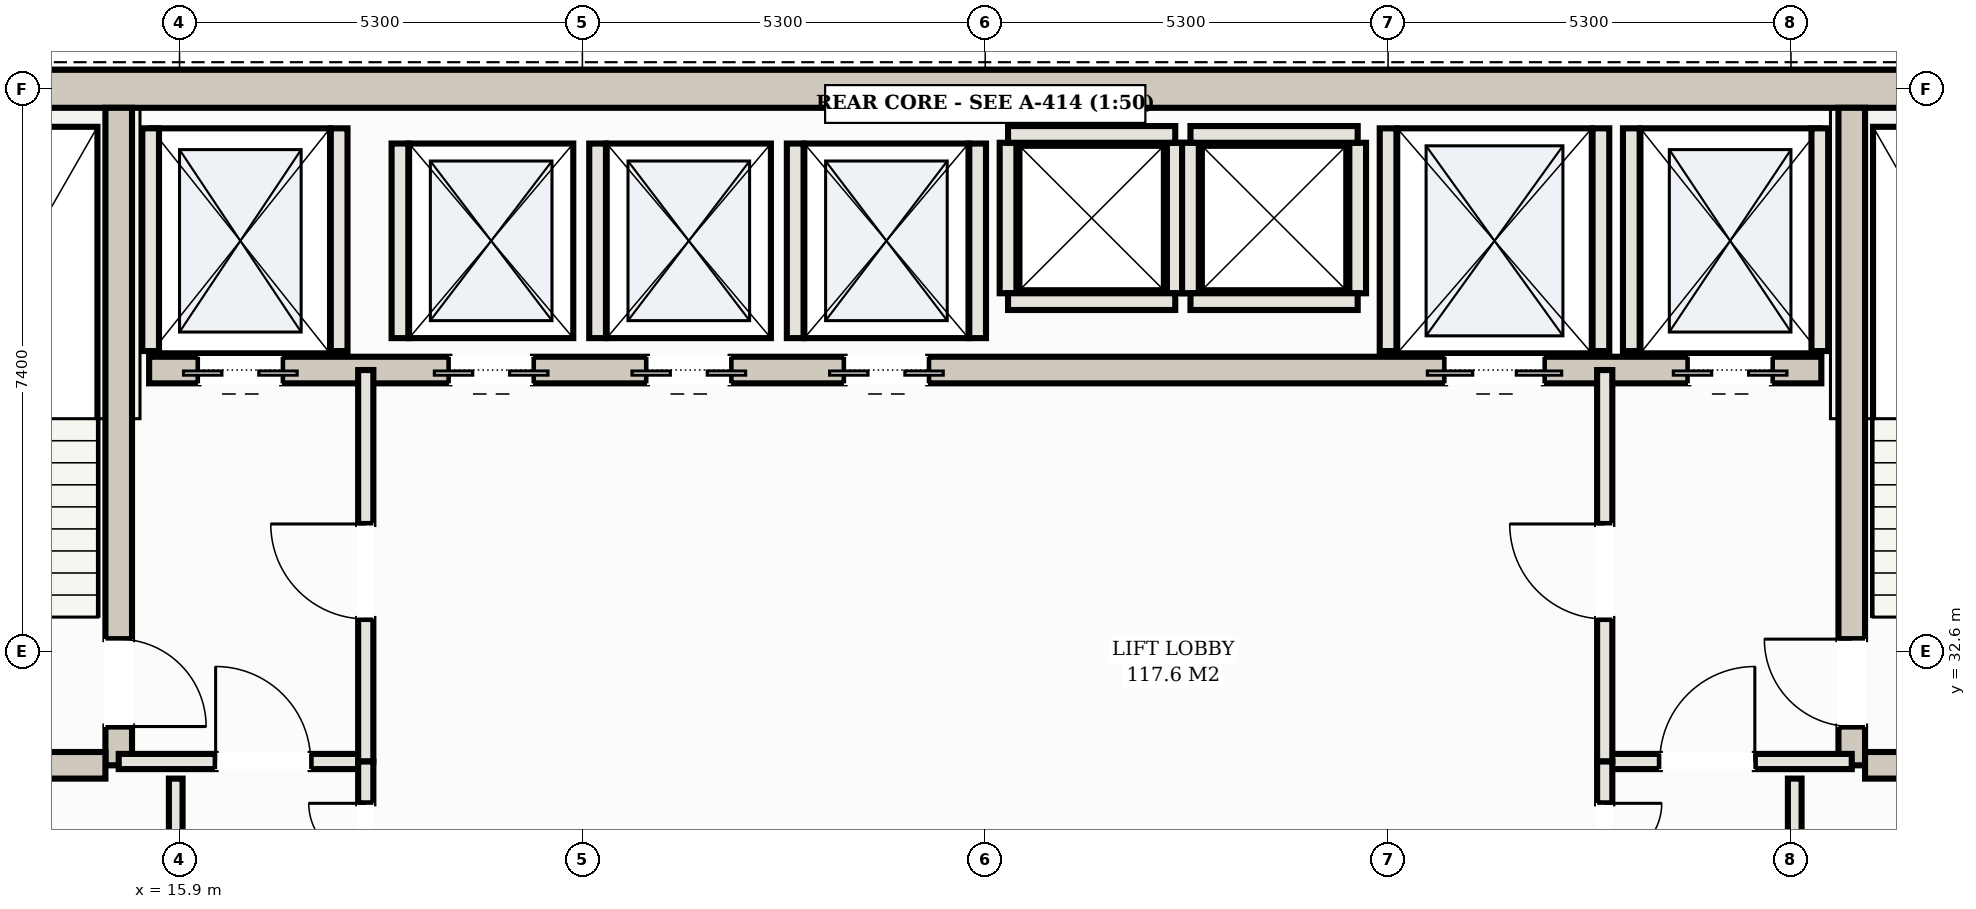
"""IFC4 building model, lengths in metres.
Left out: names, types, materials, properties, quantities, classifications, styles, units other than length and angle.
Written with IfcOpenShell. Run it as: python <this file> out.ifc"""

import sys

from ifc_helpers import new_model, si_unit, direction, frame, frame_2d, origin, place, context, subcontext, project, spatial, rectangle, extrude, element, fill, save


model = new_model("IFC4")
c1 = context("Model", 3, precision=1e-05, world=origin(), true_north=direction((0.0, 1.0)))
c2 = subcontext(c1, "Body", "Model", "MODEL_VIEW")
j1 = project(units=[si_unit("LENGTHUNIT", "METRE"), si_unit("PLANEANGLEUNIT", "RADIAN")], contexts=[c1])
p1 = place(None, origin())
s1 = spatial("IfcSite", under=j1, at=p1, CompositionType="ELEMENT")
p2 = place(p1, origin())
s2 = spatial("IfcBuilding", under=s1, at=p2, CompositionType="ELEMENT")
p3 = place(p2, frame((0.0, 0.0, 256.1)))
s3 = spatial("IfcBuildingStorey", under=s2, at=p3, CompositionType="ELEMENT", Elevation=256.1)
p4 = place(p3, frame((10.35, 40.0, 0.0), z_axis=(0.0, 0.0, 1.0), x_axis=(1.0, 0.0, 0.0)))
e1 = element("IfcWall", 1, at=p4, inside=s3, PredefinedType="SHEAR", context=c2, shape_type="SweptSolid", body=[
    extrude(rectangle(XDim=32.3, YDim=0.5, at=frame_2d((16.15, 0.0))), origin(), (0.0, 0.0, 1.0), 3.11),
])
p5 = place(p3, frame((15.1, 31.1, 0.0), z_axis=(0.0, 0.0, 1.0), x_axis=(0.0, 1.0, 0.0)))
e2 = element("IfcWall", 2, at=p5, inside=s3, PredefinedType="SHEAR", context=c2, shape_type="SweptSolid", body=[
    extrude(rectangle(XDim=8.65, YDim=0.35, at=frame_2d((4.325, 0.0))), origin(), (0.0, 0.0, 1.0), 3.11),
])
p6 = place(p5, frame((0.51, 0.0, 0.0)))
e3 = element("IfcOpeningElement", 3, at=p6, cuts=e2, PredefinedType="OPENING", context=c2, shape_type="SweptSolid", body=[
    extrude(rectangle(XDim=1.15, YDim=2.2, at=frame_2d((0.575, 1.1))), frame((0.0, 0.185, 0.0), z_axis=(0.0, -1.0, 0.0), x_axis=(1.0, 0.0, 0.0)), (0.0, 0.0, 1.0), 0.37),
])
p7 = place(p3, frame((10.85, 31.1, 0.0), z_axis=(0.0, 0.0, 1.0), x_axis=(1.0, 0.0, 0.0)))
e4 = element("IfcWall", 4, at=p7, inside=s3, PredefinedType="SHEAR", context=c2, shape_type="SweptSolid", body=[
    extrude(rectangle(XDim=4.075, YDim=0.35, at=frame_2d((2.038, 0.0))), origin(), (0.0, 0.0, 1.0), 3.11),
])
p8 = place(p3, frame((37.9, 31.1, 0.0), z_axis=(0.0, 0.0, 1.0), x_axis=(0.0, 1.0, 0.0)))
e5 = element("IfcWall", 5, at=p8, inside=s3, PredefinedType="SHEAR", context=c2, shape_type="SweptSolid", body=[
    extrude(rectangle(XDim=8.65, YDim=0.35, at=frame_2d((4.325, 0.0))), origin(), (0.0, 0.0, 1.0), 3.11),
])
p9 = place(p8, frame((0.51, 0.0, 0.0)))
e6 = element("IfcOpeningElement", 6, at=p9, cuts=e5, PredefinedType="OPENING", context=c2, shape_type="SweptSolid", body=[
    extrude(rectangle(XDim=1.15, YDim=2.2, at=frame_2d((0.575, 1.1))), frame((0.0, 0.185, 0.0), z_axis=(0.0, -1.0, 0.0), x_axis=(1.0, 0.0, 0.0)), (0.0, 0.0, 1.0), 0.37),
])
p10 = place(p3, frame((38.075, 31.1, 0.0), z_axis=(0.0, 0.0, 1.0), x_axis=(1.0, 0.0, 0.0)))
e7 = element("IfcWall", 7, at=p10, inside=s3, PredefinedType="SHEAR", context=c2, shape_type="SweptSolid", body=[
    extrude(rectangle(XDim=4.075, YDim=0.35, at=frame_2d((2.038, 0.0))), origin(), (0.0, 0.0, 1.0), 3.11),
])
p11 = place(p3, frame((15.5, 36.3, 0.0), z_axis=(0.0, 0.0, 1.0), x_axis=(1.0, 0.0, 0.0)))
e8 = element("IfcWall", 8, at=p11, inside=s3, PredefinedType="SHEAR", context=c2, shape_type="SweptSolid", body=[
    extrude(rectangle(XDim=22.0, YDim=0.35, at=frame_2d((11.0, 0.0))), origin(), (0.0, 0.0, 1.0), 3.11),
])
p12 = place(p11, frame((0.65, 0.0, 0.0)))
e9 = element("IfcOpeningElement", 9, at=p12, cuts=e8, PredefinedType="OPENING", context=c2, shape_type="SweptSolid", body=[
    extrude(rectangle(XDim=1.1, YDim=2.15, at=frame_2d((0.55, 1.075))), frame((0.0, 0.185, 0.0), z_axis=(0.0, -1.0, 0.0), x_axis=(1.0, 0.0, 0.0)), (0.0, 0.0, 1.0), 0.37),
])
p13 = place(p11, frame((20.25, 0.0, 0.0)))
e10 = element("IfcOpeningElement", 10, at=p13, cuts=e8, PredefinedType="OPENING", context=c2, shape_type="SweptSolid", body=[
    extrude(rectangle(XDim=1.1, YDim=2.15, at=frame_2d((0.55, 1.075))), frame((0.0, 0.185, 0.0), z_axis=(0.0, -1.0, 0.0), x_axis=(1.0, 0.0, 0.0)), (0.0, 0.0, 1.0), 0.37),
])
p14 = place(p11, frame((17.05, 0.0, 0.0)))
e11 = element("IfcOpeningElement", 11, at=p14, cuts=e8, PredefinedType="OPENING", context=c2, shape_type="SweptSolid", body=[
    extrude(rectangle(XDim=1.3, YDim=2.2, at=frame_2d((0.65, 1.1))), frame((0.0, 0.185, 0.0), z_axis=(0.0, -1.0, 0.0), x_axis=(1.0, 0.0, 0.0)), (0.0, 0.0, 1.0), 0.37),
])
p15 = place(p11, frame((3.95, 0.0, 0.0)))
e12 = element("IfcOpeningElement", 12, at=p15, cuts=e8, PredefinedType="OPENING", context=c2, shape_type="SweptSolid", body=[
    extrude(rectangle(XDim=1.1, YDim=2.15, at=frame_2d((0.55, 1.075))), frame((0.0, 0.185, 0.0), z_axis=(0.0, -1.0, 0.0), x_axis=(1.0, 0.0, 0.0)), (0.0, 0.0, 1.0), 0.37),
])
p16 = place(p11, frame((6.55, 0.0, 0.0)))
e13 = element("IfcOpeningElement", 13, at=p16, cuts=e8, PredefinedType="OPENING", context=c2, shape_type="SweptSolid", body=[
    extrude(rectangle(XDim=1.1, YDim=2.15, at=frame_2d((0.55, 1.075))), frame((0.0, 0.185, 0.0), z_axis=(0.0, -1.0, 0.0), x_axis=(1.0, 0.0, 0.0)), (0.0, 0.0, 1.0), 0.37),
])
p17 = place(p11, frame((9.15, 0.0, 0.0)))
e14 = element("IfcOpeningElement", 14, at=p17, cuts=e8, PredefinedType="OPENING", context=c2, shape_type="SweptSolid", body=[
    extrude(rectangle(XDim=1.1, YDim=2.15, at=frame_2d((0.55, 1.075))), frame((0.0, 0.185, 0.0), z_axis=(0.0, -1.0, 0.0), x_axis=(1.0, 0.0, 0.0)), (0.0, 0.0, 1.0), 0.37),
])
for number, where, z_axis, x_axis in (
    (15, (15.52, 36.55, 0.0), (0.0, 0.0, 1.0), (0.0, 1.0, 0.0)),
    (16, (18.0, 36.55, 0.0), (0.0, 0.0, 1.0), (0.0, 1.0, 0.0)),
    (17, (35.0, 36.55, 0.0), (0.0, 0.0, 1.0), (0.0, 1.0, 0.0)),
    (18, (37.48, 36.55, 0.0), (0.0, 0.0, 1.0), (0.0, 1.0, 0.0)),
    (19, (31.8, 36.55, 0.0), (0.0, 0.0, 1.0), (0.0, 1.0, 0.0)),
    (20, (34.6, 36.55, 0.0), (0.0, 0.0, 1.0), (0.0, 1.0, 0.0)),
):
    element("IfcWall", number, at=place(p3, frame(where, z_axis=z_axis, x_axis=x_axis)), inside=s3, PredefinedType="SOLIDWALL", context=c2, shape_type="SweptSolid", body=[
        extrude(rectangle(XDim=2.93, YDim=0.22, at=frame_2d((1.465, 0.0))), origin(), (0.0, 0.0, 1.0), 3.11),
    ])
for number, where, z_axis, x_axis in (
    (21, (18.8, 36.72, 0.0), (0.0, 0.0, 1.0), (0.0, 1.0, 0.0)),
    (22, (21.4, 36.72, 0.0), (0.0, 0.0, 1.0), (0.0, 1.0, 0.0)),
    (23, (24.0, 36.72, 0.0), (0.0, 0.0, 1.0), (0.0, 1.0, 0.0)),
    (24, (26.4, 36.72, 0.0), (0.0, 0.0, 1.0), (0.0, 1.0, 0.0)),
):
    element("IfcWall", number, at=place(p3, frame(where, z_axis=z_axis, x_axis=x_axis)), inside=s3, PredefinedType="SOLIDWALL", context=c2, shape_type="SweptSolid", body=[
        extrude(rectangle(XDim=2.56, YDim=0.22, at=frame_2d((1.28, 0.0))), origin(), (0.0, 0.0, 1.0), 3.11),
    ])
for number, where, z_axis, x_axis in (
    (25, (26.8, 37.31, 0.0), (0.0, 0.0, 1.0), (0.0, 1.0, 0.0)),
    (26, (29.0, 37.31, 0.0), (0.0, 0.0, 1.0), (0.0, 1.0, 0.0)),
):
    element("IfcWall", number, at=place(p3, frame(where, z_axis=z_axis, x_axis=x_axis)), inside=s3, PredefinedType="SOLIDWALL", context=c2, shape_type="SweptSolid", body=[
        extrude(rectangle(XDim=1.98, YDim=0.22, at=frame_2d((0.99, 0.0))), origin(), (0.0, 0.0, 1.0), 3.11),
    ])
for number, where, z_axis, x_axis in (
    (27, (26.8, 39.4, 0.0), (0.0, 0.0, 1.0), (1.0, 0.0, 0.0)),
    (28, (26.8, 37.2, 0.0), (0.0, 0.0, 1.0), (1.0, 0.0, 0.0)),
):
    element("IfcWall", number, at=place(p3, frame(where, z_axis=z_axis, x_axis=x_axis)), inside=s3, PredefinedType="SOLIDWALL", context=c2, shape_type="SweptSolid", body=[
        extrude(rectangle(XDim=2.2, YDim=0.22, at=frame_2d((1.1, 0.0))), origin(), (0.0, 0.0, 1.0), 3.11),
    ])
for number, where, z_axis, x_axis in (
    (29, (29.2, 37.31, 0.0), (0.0, 0.0, 1.0), (0.0, 1.0, 0.0)),
    (30, (31.4, 37.31, 0.0), (0.0, 0.0, 1.0), (0.0, 1.0, 0.0)),
):
    element("IfcWall", number, at=place(p3, frame(where, z_axis=z_axis, x_axis=x_axis)), inside=s3, PredefinedType="SOLIDWALL", context=c2, shape_type="SweptSolid", body=[
        extrude(rectangle(XDim=1.98, YDim=0.22, at=frame_2d((0.99, 0.0))), origin(), (0.0, 0.0, 1.0), 3.11),
    ])
for number, where, z_axis, x_axis in (
    (31, (29.2, 39.4, 0.0), (0.0, 0.0, 1.0), (1.0, 0.0, 0.0)),
    (32, (29.2, 37.2, 0.0), (0.0, 0.0, 1.0), (1.0, 0.0, 0.0)),
):
    element("IfcWall", number, at=place(p3, frame(where, z_axis=z_axis, x_axis=x_axis)), inside=s3, PredefinedType="SOLIDWALL", context=c2, shape_type="SweptSolid", body=[
        extrude(rectangle(XDim=2.2, YDim=0.22, at=frame_2d((1.1, 0.0))), origin(), (0.0, 0.0, 1.0), 3.11),
    ])
p18 = place(p3, frame((15.1, 31.15, 0.0), z_axis=(0.0, 0.0, 1.0), x_axis=(1.0, 0.0, 0.0)))
e33 = element("IfcWall", 33, at=p18, inside=s3, PredefinedType="PARTITIONING", context=c2, shape_type="SweptSolid", body=[
    extrude(rectangle(XDim=3.25, YDim=0.2, at=frame_2d((1.625, 0.0))), origin(), (0.0, 0.0, 1.0), 2.45),
])
p19 = place(p18, frame((1.275, 0.0, 0.0)))
e34 = element("IfcOpeningElement", 34, at=p19, cuts=e33, PredefinedType="OPENING", context=c2, shape_type="SweptSolid", body=[
    extrude(rectangle(XDim=1.25, YDim=2.2, at=frame_2d((0.625, 1.1))), frame((0.0, 0.11, 0.0), z_axis=(0.0, -1.0, 0.0), x_axis=(1.0, 0.0, 0.0)), (0.0, 0.0, 1.0), 0.22),
])
p20 = place(p3, frame((18.35, 31.15, 0.0), z_axis=(0.0, 0.0, 1.0), x_axis=(0.0, 1.0, 0.0)))
e35 = element("IfcWall", 35, at=p20, inside=s3, PredefinedType="PARTITIONING", context=c2, shape_type="SweptSolid", body=[
    extrude(rectangle(XDim=5.15, YDim=0.2, at=frame_2d((2.575, 0.0))), origin(), (0.0, 0.0, 1.0), 2.45),
])
p21 = place(p20, frame((1.875, 0.0, 0.0)))
e36 = element("IfcOpeningElement", 36, at=p21, cuts=e35, PredefinedType="OPENING", context=c2, shape_type="SweptSolid", body=[
    extrude(rectangle(XDim=1.25, YDim=2.2, at=frame_2d((0.625, 1.1))), frame((0.0, 0.11, 0.0), z_axis=(0.0, -1.0, 0.0), x_axis=(1.0, 0.0, 0.0)), (0.0, 0.0, 1.0), 0.22),
])
p22 = place(p3, frame((34.65, 31.15, 0.0), z_axis=(0.0, 0.0, 1.0), x_axis=(1.0, 0.0, 0.0)))
e37 = element("IfcWall", 37, at=p22, inside=s3, PredefinedType="PARTITIONING", context=c2, shape_type="SweptSolid", body=[
    extrude(rectangle(XDim=3.25, YDim=0.2, at=frame_2d((1.625, 0.0))), origin(), (0.0, 0.0, 1.0), 2.45),
])
p23 = place(p22, frame((0.725, 0.0, 0.0)))
e38 = element("IfcOpeningElement", 38, at=p23, cuts=e37, PredefinedType="OPENING", context=c2, shape_type="SweptSolid", body=[
    extrude(rectangle(XDim=1.25, YDim=2.2, at=frame_2d((0.625, 1.1))), frame((0.0, 0.11, 0.0), z_axis=(0.0, -1.0, 0.0), x_axis=(1.0, 0.0, 0.0)), (0.0, 0.0, 1.0), 0.22),
])
p24 = place(p3, frame((34.65, 31.15, 0.0), z_axis=(0.0, 0.0, 1.0), x_axis=(0.0, 1.0, 0.0)))
e39 = element("IfcWall", 39, at=p24, inside=s3, PredefinedType="PARTITIONING", context=c2, shape_type="SweptSolid", body=[
    extrude(rectangle(XDim=5.15, YDim=0.2, at=frame_2d((2.575, 0.0))), origin(), (0.0, 0.0, 1.0), 2.45),
])
p25 = place(p24, frame((1.875, 0.0, 0.0)))
e40 = element("IfcOpeningElement", 40, at=p25, cuts=e39, PredefinedType="OPENING", context=c2, shape_type="SweptSolid", body=[
    extrude(rectangle(XDim=1.25, YDim=2.2, at=frame_2d((0.625, 1.1))), frame((0.0, 0.11, 0.0), z_axis=(0.0, -1.0, 0.0), x_axis=(1.0, 0.0, 0.0)), (0.0, 0.0, 1.0), 0.22),
])
p26 = place(p3, frame((15.85, 25.45, 0.0), z_axis=(0.0, 0.0, 1.0), x_axis=(0.0, 1.0, 0.0)))
e41 = element("IfcWall", 41, at=p26, inside=s3, PredefinedType="PARTITIONING", context=c2, shape_type="SweptSolid", body=[
    extrude(rectangle(XDim=5.475, YDim=0.18, at=frame_2d((2.738, 0.0))), origin(), (0.0, 0.0, 1.0), 2.45),
])
p27 = place(p26, frame((2.277, 0.0, 0.0)))
e42 = element("IfcOpeningElement", 42, at=p27, cuts=e41, PredefinedType="OPENING", context=c2, shape_type="SweptSolid", body=[
    extrude(rectangle(XDim=0.92, YDim=2.15, at=frame_2d((0.46, 1.075))), frame((0.0, 0.1, 0.0), z_axis=(0.0, -1.0, 0.0), x_axis=(1.0, 0.0, 0.0)), (0.0, 0.0, 1.0), 0.2),
])
p28 = place(p3, frame((37.15, 25.45, 0.0), z_axis=(0.0, 0.0, 1.0), x_axis=(0.0, 1.0, 0.0)))
e43 = element("IfcWall", 43, at=p28, inside=s3, PredefinedType="PARTITIONING", context=c2, shape_type="SweptSolid", body=[
    extrude(rectangle(XDim=5.475, YDim=0.18, at=frame_2d((2.738, 0.0))), origin(), (0.0, 0.0, 1.0), 2.45),
])
p29 = place(p28, frame((0.765, 0.0, 0.0)))
e44 = element("IfcOpeningElement", 44, at=p29, cuts=e43, PredefinedType="OPENING", context=c2, shape_type="SweptSolid", body=[
    extrude(rectangle(XDim=0.92, YDim=2.15, at=frame_2d((0.46, 1.075))), frame((0.0, 0.1, 0.0), z_axis=(0.0, -1.0, 0.0), x_axis=(1.0, 0.0, 0.0)), (0.0, 0.0, 1.0), 0.2),
])
p30 = place(p28, frame((3.452, 0.0, 0.0)))
e45 = element("IfcOpeningElement", 45, at=p30, cuts=e43, PredefinedType="OPENING", context=c2, shape_type="SweptSolid", body=[
    extrude(rectangle(XDim=0.92, YDim=2.15, at=frame_2d((0.46, 1.075))), frame((0.0, 0.1, 0.0), z_axis=(0.0, -1.0, 0.0), x_axis=(1.0, 0.0, 0.0)), (0.0, 0.0, 1.0), 0.2),
])
p31 = place(p3, frame((18.35, 28.55, 0.0), z_axis=(0.0, 0.0, 1.0), x_axis=(0.0, 1.0, 0.0)))
e46 = element("IfcWall", 46, at=p31, inside=s3, PredefinedType="PARTITIONING", context=c2, shape_type="SweptSolid", body=[
    extrude(rectangle(XDim=2.6, YDim=0.2, at=frame_2d((1.3, 0.0))), origin(), (0.0, 0.0, 1.0), 2.45),
])
p32 = place(p31, frame((0.55, 0.0, 0.0)))
e47 = element("IfcOpeningElement", 47, at=p32, cuts=e46, PredefinedType="OPENING", context=c2, shape_type="SweptSolid", body=[
    extrude(rectangle(XDim=1.5, YDim=2.25, at=frame_2d((0.75, 1.125))), frame((0.0, 0.11, 0.0), z_axis=(0.0, -1.0, 0.0), x_axis=(1.0, 0.0, 0.0)), (0.0, 0.0, 1.0), 0.22),
])
p33 = place(p3, frame((34.65, 28.55, 0.0), z_axis=(0.0, 0.0, 1.0), x_axis=(0.0, 1.0, 0.0)))
e48 = element("IfcWall", 48, at=p33, inside=s3, PredefinedType="PARTITIONING", context=c2, shape_type="SweptSolid", body=[
    extrude(rectangle(XDim=2.6, YDim=0.2, at=frame_2d((1.3, 0.0))), origin(), (0.0, 0.0, 1.0), 2.45),
])
p34 = place(p33, frame((0.55, 0.0, 0.0)))
e49 = element("IfcOpeningElement", 49, at=p34, cuts=e48, PredefinedType="OPENING", context=c2, shape_type="SweptSolid", body=[
    extrude(rectangle(XDim=1.5, YDim=2.25, at=frame_2d((0.75, 1.125))), frame((0.0, 0.11, 0.0), z_axis=(0.0, -1.0, 0.0), x_axis=(1.0, 0.0, 0.0)), (0.0, 0.0, 1.0), 0.22),
])
p35 = place(p12, frame((1.1, 0.0, 0.0), z_axis=(0.0, 0.0, 1.0), x_axis=(-1.0, 0.0, 0.0)))
e50 = element("IfcDoor", 50, at=p35, inside=s3, OperationType="DOUBLE_DOOR_SLIDING", PredefinedType="DOOR", context=c2, shape_type="SweptSolid", body=[
    extrude(rectangle(XDim=1.1, YDim=2.15, at=frame_2d((0.55, 1.075))), frame((0.0, 0.025, 0.0), z_axis=(0.0, -1.0, 0.0), x_axis=(1.0, 0.0, 0.0)), (0.0, 0.0, 1.0), 0.05),
])
fill(e9, e50)
p36 = place(p13, frame((1.1, 0.0, 0.0), z_axis=(0.0, 0.0, 1.0), x_axis=(-1.0, 0.0, 0.0)))
e51 = element("IfcDoor", 51, at=p36, inside=s3, OperationType="DOUBLE_DOOR_SLIDING", PredefinedType="DOOR", context=c2, shape_type="SweptSolid", body=[
    extrude(rectangle(XDim=1.1, YDim=2.15, at=frame_2d((0.55, 1.075))), frame((0.0, 0.025, 0.0), z_axis=(0.0, -1.0, 0.0), x_axis=(1.0, 0.0, 0.0)), (0.0, 0.0, 1.0), 0.05),
])
fill(e10, e51)
p37 = place(p14, frame((1.3, 0.0, 0.0), z_axis=(0.0, 0.0, 1.0), x_axis=(-1.0, 0.0, 0.0)))
e52 = element("IfcDoor", 52, at=p37, inside=s3, OperationType="DOUBLE_DOOR_SLIDING", PredefinedType="DOOR", context=c2, shape_type="SweptSolid", body=[
    extrude(rectangle(XDim=1.3, YDim=2.2, at=frame_2d((0.65, 1.1))), frame((0.0, 0.025, 0.0), z_axis=(0.0, -1.0, 0.0), x_axis=(1.0, 0.0, 0.0)), (0.0, 0.0, 1.0), 0.05),
])
fill(e11, e52)
p38 = place(p15, frame((1.1, 0.0, 0.0), z_axis=(0.0, 0.0, 1.0), x_axis=(-1.0, 0.0, 0.0)))
e53 = element("IfcDoor", 53, at=p38, inside=s3, OperationType="DOUBLE_DOOR_SLIDING", PredefinedType="DOOR", context=c2, shape_type="SweptSolid", body=[
    extrude(rectangle(XDim=1.1, YDim=2.15, at=frame_2d((0.55, 1.075))), frame((0.0, 0.025, 0.0), z_axis=(0.0, -1.0, 0.0), x_axis=(1.0, 0.0, 0.0)), (0.0, 0.0, 1.0), 0.05),
])
fill(e12, e53)
p39 = place(p16, frame((1.1, 0.0, 0.0), z_axis=(0.0, 0.0, 1.0), x_axis=(-1.0, 0.0, 0.0)))
e54 = element("IfcDoor", 54, at=p39, inside=s3, OperationType="DOUBLE_DOOR_SLIDING", PredefinedType="DOOR", context=c2, shape_type="SweptSolid", body=[
    extrude(rectangle(XDim=1.1, YDim=2.15, at=frame_2d((0.55, 1.075))), frame((0.0, 0.025, 0.0), z_axis=(0.0, -1.0, 0.0), x_axis=(1.0, 0.0, 0.0)), (0.0, 0.0, 1.0), 0.05),
])
fill(e13, e54)
p40 = place(p17, frame((1.1, 0.0, 0.0), z_axis=(0.0, 0.0, 1.0), x_axis=(-1.0, 0.0, 0.0)))
e55 = element("IfcDoor", 55, at=p40, inside=s3, OperationType="DOUBLE_DOOR_SLIDING", PredefinedType="DOOR", context=c2, shape_type="SweptSolid", body=[
    extrude(rectangle(XDim=1.1, YDim=2.15, at=frame_2d((0.55, 1.075))), frame((0.0, 0.025, 0.0), z_axis=(0.0, -1.0, 0.0), x_axis=(1.0, 0.0, 0.0)), (0.0, 0.0, 1.0), 0.05),
])
fill(e14, e55)
p41 = place(p19, origin())
e56 = element("IfcDoor", 56, at=p41, inside=s3, OperationType="SINGLE_SWING_LEFT", PredefinedType="DOOR", context=c2, shape_type="SweptSolid", body=[
    extrude(rectangle(XDim=1.25, YDim=2.2, at=frame_2d((0.625, 1.1))), frame((0.0, 0.025, 0.0), z_axis=(0.0, -1.0, 0.0), x_axis=(1.0, 0.0, 0.0)), (0.0, 0.0, 1.0), 0.05),
])
fill(e34, e56)
p42 = place(p21, origin())
e57 = element("IfcDoor", 57, at=p42, inside=s3, OperationType="SINGLE_SWING_RIGHT", PredefinedType="DOOR", context=c2, shape_type="SweptSolid", body=[
    extrude(rectangle(XDim=1.25, YDim=2.2, at=frame_2d((0.625, 1.1))), frame((0.0, 0.025, 0.0), z_axis=(0.0, -1.0, 0.0), x_axis=(1.0, 0.0, 0.0)), (0.0, 0.0, 1.0), 0.05),
])
fill(e36, e57)
p43 = place(p23, origin())
e58 = element("IfcDoor", 58, at=p43, inside=s3, OperationType="SINGLE_SWING_RIGHT", PredefinedType="DOOR", context=c2, shape_type="SweptSolid", body=[
    extrude(rectangle(XDim=1.25, YDim=2.2, at=frame_2d((0.625, 1.1))), frame((0.0, 0.025, 0.0), z_axis=(0.0, -1.0, 0.0), x_axis=(1.0, 0.0, 0.0)), (0.0, 0.0, 1.0), 0.05),
])
fill(e38, e58)
p44 = place(p25, origin())
e59 = element("IfcDoor", 59, at=p44, inside=s3, OperationType="SINGLE_SWING_RIGHT", PredefinedType="DOOR", context=c2, shape_type="SweptSolid", body=[
    extrude(rectangle(XDim=1.25, YDim=2.2, at=frame_2d((0.625, 1.1))), frame((0.0, 0.025, 0.0), z_axis=(0.0, -1.0, 0.0), x_axis=(1.0, 0.0, 0.0)), (0.0, 0.0, 1.0), 0.05),
])
fill(e40, e59)
p45 = place(p6, frame((1.15, 0.0, 0.0), z_axis=(0.0, 0.0, 1.0), x_axis=(-1.0, 0.0, 0.0)))
e60 = element("IfcDoor", 60, at=p45, inside=s3, OperationType="SINGLE_SWING_RIGHT", PredefinedType="DOOR", context=c2, shape_type="SweptSolid", body=[
    extrude(rectangle(XDim=1.15, YDim=2.2, at=frame_2d((0.575, 1.1))), frame((0.0, 0.025, 0.0), z_axis=(0.0, -1.0, 0.0), x_axis=(1.0, 0.0, 0.0)), (0.0, 0.0, 1.0), 0.05),
])
fill(e3, e60)
p46 = place(p9, origin())
e61 = element("IfcDoor", 61, at=p46, inside=s3, OperationType="SINGLE_SWING_RIGHT", PredefinedType="DOOR", context=c2, shape_type="SweptSolid", body=[
    extrude(rectangle(XDim=1.15, YDim=2.2, at=frame_2d((0.575, 1.1))), frame((0.0, 0.025, 0.0), z_axis=(0.0, -1.0, 0.0), x_axis=(1.0, 0.0, 0.0)), (0.0, 0.0, 1.0), 0.05),
])
fill(e6, e61)
p47 = place(p32, origin())
e62 = element("IfcDoor", 62, at=p47, inside=s3, OperationType="DOUBLE_DOOR_SINGLE_SWING", PredefinedType="DOOR", context=c2, shape_type="SweptSolid", body=[
    extrude(rectangle(XDim=1.5, YDim=2.25, at=frame_2d((0.75, 1.125))), frame((0.0, 0.025, 0.0), z_axis=(0.0, -1.0, 0.0), x_axis=(1.0, 0.0, 0.0)), (0.0, 0.0, 1.0), 0.05),
])
fill(e47, e62)
p48 = place(p34, frame((1.5, 0.0, 0.0), z_axis=(0.0, 0.0, 1.0), x_axis=(-1.0, 0.0, 0.0)))
e63 = element("IfcDoor", 63, at=p48, inside=s3, OperationType="DOUBLE_DOOR_SINGLE_SWING", PredefinedType="DOOR", context=c2, shape_type="SweptSolid", body=[
    extrude(rectangle(XDim=1.5, YDim=2.25, at=frame_2d((0.75, 1.125))), frame((0.0, 0.025, 0.0), z_axis=(0.0, -1.0, 0.0), x_axis=(1.0, 0.0, 0.0)), (0.0, 0.0, 1.0), 0.05),
])
fill(e49, e63)
save(model, sys.argv[1])
